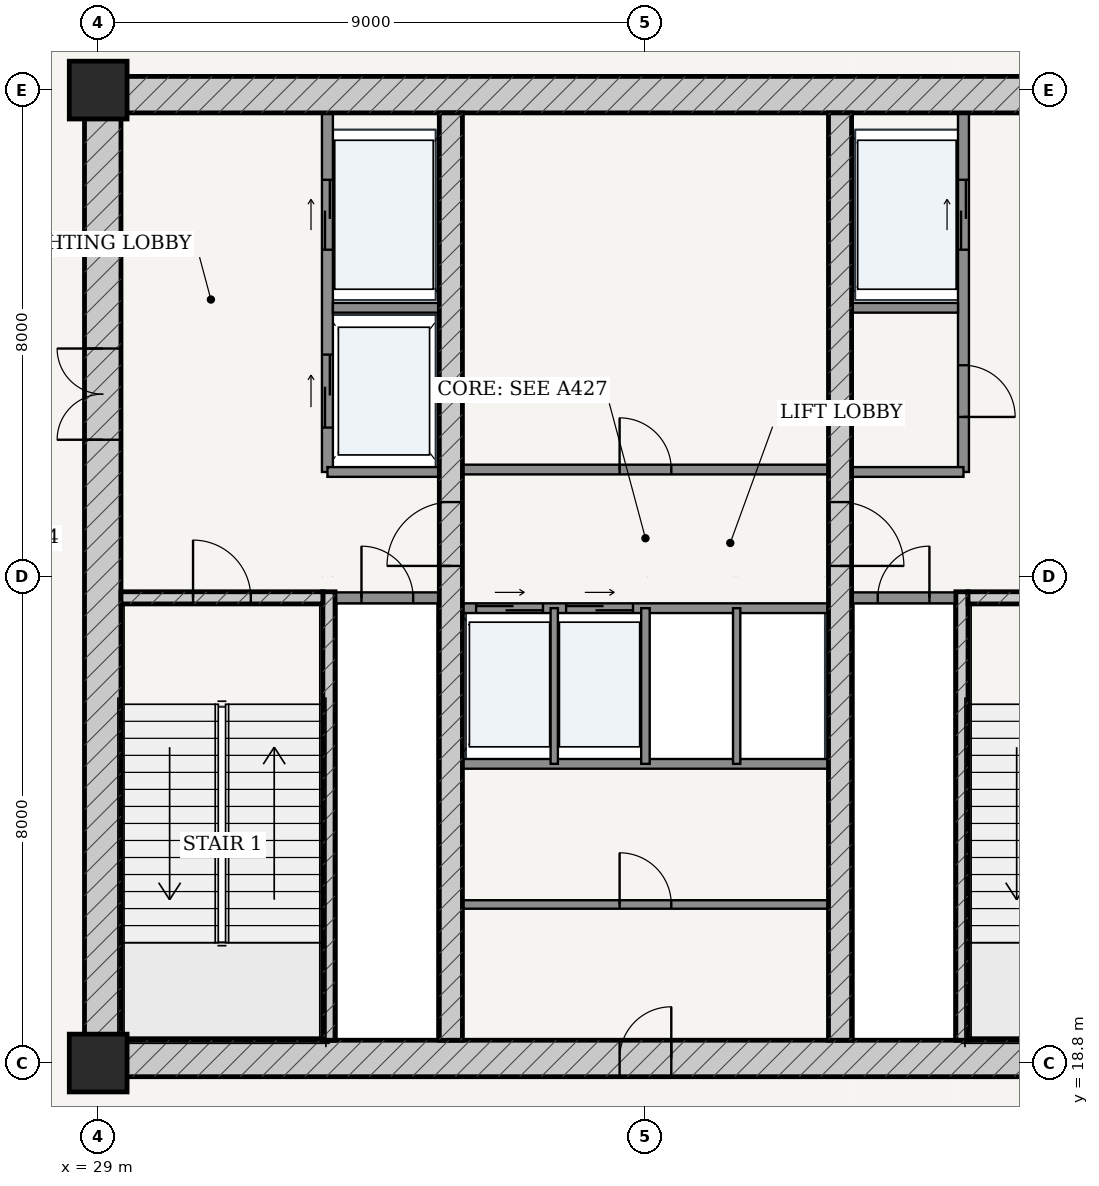
"""IFC4 building model, lengths in metres.
Left out: names, types, materials, properties, quantities, classifications, styles, units other than length and angle.
Written with IfcOpenShell. Run it as: python <this file> out.ifc"""

import sys

from ifc_helpers import new_model, si_unit, direction, frame, frame_2d, origin, origin_2d, place, context, subcontext, project, spatial, rectangle, extrude, source, transform, mapped, element, fill, save


model = new_model("IFC4")
c1 = context("Model", 3, precision=1e-05, world=origin(), true_north=direction((-0.2419218956, 0.970295726276)))
c2 = subcontext(c1, "Body", "Model", "MODEL_VIEW")
j1 = project(units=[si_unit("LENGTHUNIT", "METRE"), si_unit("PLANEANGLEUNIT", "RADIAN")], contexts=[c1])
p1 = place(None, origin())
s1 = spatial("IfcSite", under=j1, at=p1, CompositionType="ELEMENT")
p2 = place(p1, origin())
s2 = spatial("IfcBuilding", under=s1, at=p2, CompositionType="ELEMENT")
p3 = place(p2, frame((0.0, 0.0, 185.8)))
s3 = spatial("IfcBuildingStorey", under=s2, at=p3, CompositionType="ELEMENT", Elevation=185.8)
for number, where, z_axis, x_axis in (
    (1, (29.0, 18.8, 0.0), (0.0, 0.0, 1.0), (1.0, 0.0, 0.0)),
    (2, (29.0, 34.8, 0.0), (0.0, 0.0, 1.0), (1.0, 0.0, 0.0)),
):
    element("IfcColumn", number, at=place(p3, frame(where, z_axis=z_axis, x_axis=x_axis)), inside=s3, PredefinedType="COLUMN", context=c2, shape_type="SweptSolid", body=[
        extrude(rectangle(XDim=0.95, YDim=0.95, at=origin_2d()), origin(), (0.0, 0.0, 1.0), 5.4),
    ])
p4 = place(p3, frame((28.775, 18.875, 0.0), z_axis=(0.0, 0.0, 1.0), x_axis=(1.0, 0.0, 0.0)))
e3 = element("IfcWall", 3, at=p4, inside=s3, PredefinedType="SHEAR", context=c2, shape_type="SweptSolid", body=[
    extrude(rectangle(XDim=18.45, YDim=0.6, at=frame_2d((9.225, 0.0))), origin(), (0.0, 0.0, 1.0), 5.135),
])
p5 = place(p4, frame((8.8, 0.0, 0.0)))
e4 = element("IfcOpeningElement", 4, at=p5, cuts=e3, PredefinedType="OPENING", context=c2, shape_type="SweptSolid", body=[
    extrude(rectangle(XDim=0.85, YDim=2.1, at=frame_2d((0.425, 1.05))), frame((0.0, 0.31, 0.0), z_axis=(0.0, -1.0, 0.0), x_axis=(1.0, 0.0, 0.0)), (0.0, 0.0, 1.0), 0.62),
])
p6 = place(p3, frame((28.775, 34.725, 0.0), z_axis=(0.0, 0.0, 1.0), x_axis=(1.0, 0.0, 0.0)))
e5 = element("IfcWall", 5, at=p6, inside=s3, PredefinedType="SHEAR", context=c2, shape_type="SweptSolid", body=[
    extrude(rectangle(XDim=18.45, YDim=0.6, at=frame_2d((9.225, 0.0))), origin(), (0.0, 0.0, 1.0), 5.135),
])
p7 = place(p3, frame((29.075, 19.175, 0.0), z_axis=(0.0, 0.0, 1.0), x_axis=(0.0, 1.0, 0.0)))
e6 = element("IfcWall", 6, at=p7, inside=s3, PredefinedType="SHEAR", context=c2, shape_type="SweptSolid", body=[
    extrude(rectangle(XDim=15.25, YDim=0.6, at=frame_2d((7.625, 0.0))), origin(), (0.0, 0.0, 1.0), 5.135),
])
p8 = place(p7, frame((9.875, 0.0, 0.0)))
e7 = element("IfcOpeningElement", 7, at=p8, cuts=e6, PredefinedType="OPENING", context=c2, shape_type="SweptSolid", body=[
    extrude(rectangle(XDim=1.5, YDim=2.2, at=frame_2d((0.75, 1.1))), frame((0.0, 0.31, 0.0), z_axis=(0.0, -1.0, 0.0), x_axis=(1.0, 0.0, 0.0)), (0.0, 0.0, 1.0), 0.62),
])
p9 = place(p3, frame((32.795, 19.175, 0.0), z_axis=(0.0, 0.0, 1.0), x_axis=(0.0, 1.0, 0.0)))
e8 = element("IfcWall", 8, at=p9, inside=s3, PredefinedType="SOLIDWALL", context=c2, shape_type="SweptSolid", body=[
    extrude(rectangle(XDim=7.375, YDim=0.2, at=frame_2d((3.688, 0.0))), origin(), (0.0, 0.0, 1.0), 5.135),
])
p10 = place(p3, frame((29.375, 26.45, 0.0), z_axis=(0.0, 0.0, 1.0), x_axis=(1.0, 0.0, 0.0)))
e9 = element("IfcWall", 9, at=p10, inside=s3, PredefinedType="SOLIDWALL", context=c2, shape_type="SweptSolid", body=[
    extrude(rectangle(XDim=3.32, YDim=0.2, at=frame_2d((1.66, 0.0))), origin(), (0.0, 0.0, 1.0), 5.135),
])
p11 = place(p10, frame((1.185, 0.0, 0.0)))
e10 = element("IfcOpeningElement", 10, at=p11, cuts=e9, PredefinedType="OPENING", context=c2, shape_type="SweptSolid", body=[
    extrude(rectangle(XDim=0.95, YDim=2.15, at=frame_2d((0.475, 1.075))), frame((0.0, 0.11, 0.0), z_axis=(0.0, -1.0, 0.0), x_axis=(1.0, 0.0, 0.0)), (0.0, 0.0, 1.0), 0.22),
])
p12 = place(p3, frame((43.205, 19.175, 0.0), z_axis=(0.0, 0.0, 1.0), x_axis=(0.0, 1.0, 0.0)))
e11 = element("IfcWall", 11, at=p12, inside=s3, PredefinedType="SOLIDWALL", context=c2, shape_type="SweptSolid", body=[
    extrude(rectangle(XDim=7.375, YDim=0.2, at=frame_2d((3.688, 0.0))), origin(), (0.0, 0.0, 1.0), 5.135),
])
p13 = place(p3, frame((43.305, 26.45, 0.0), z_axis=(0.0, 0.0, 1.0), x_axis=(1.0, 0.0, 0.0)))
e12 = element("IfcWall", 12, at=p13, inside=s3, PredefinedType="SOLIDWALL", context=c2, shape_type="SweptSolid", body=[
    extrude(rectangle(XDim=3.32, YDim=0.2, at=frame_2d((1.66, 0.0))), origin(), (0.0, 0.0, 1.0), 5.135),
])
p14 = place(p13, frame((1.185, 0.0, 0.0)))
e13 = element("IfcOpeningElement", 13, at=p14, cuts=e12, PredefinedType="OPENING", context=c2, shape_type="SweptSolid", body=[
    extrude(rectangle(XDim=0.95, YDim=2.15, at=frame_2d((0.475, 1.075))), frame((0.0, 0.11, 0.0), z_axis=(0.0, -1.0, 0.0), x_axis=(1.0, 0.0, 0.0)), (0.0, 0.0, 1.0), 0.22),
])
p15 = place(p3, frame((34.8, 19.175, 0.0), z_axis=(0.0, 0.0, 1.0), x_axis=(0.0, 1.0, 0.0)))
e14 = element("IfcWall", 14, at=p15, inside=s3, PredefinedType="SHEAR", context=c2, shape_type="SweptSolid", body=[
    extrude(rectangle(XDim=15.25, YDim=0.38, at=frame_2d((7.625, 0.0))), origin(), (0.0, 0.0, 1.0), 5.135),
])
p16 = place(p15, frame((7.8, 0.0, 0.0)))
e15 = element("IfcOpeningElement", 15, at=p16, cuts=e14, PredefinedType="OPENING", context=c2, shape_type="SweptSolid", body=[
    extrude(rectangle(XDim=1.05, YDim=2.15, at=frame_2d((0.525, 1.075))), frame((0.0, 0.2, 0.0), z_axis=(0.0, -1.0, 0.0), x_axis=(1.0, 0.0, 0.0)), (0.0, 0.0, 1.0), 0.4),
])
p17 = place(p3, frame((41.2, 19.175, 0.0), z_axis=(0.0, 0.0, 1.0), x_axis=(0.0, 1.0, 0.0)))
e16 = element("IfcWall", 16, at=p17, inside=s3, PredefinedType="SHEAR", context=c2, shape_type="SweptSolid", body=[
    extrude(rectangle(XDim=15.25, YDim=0.38, at=frame_2d((7.625, 0.0))), origin(), (0.0, 0.0, 1.0), 5.135),
])
p18 = place(p17, frame((7.8, 0.0, 0.0)))
e17 = element("IfcOpeningElement", 17, at=p18, cuts=e16, PredefinedType="OPENING", context=c2, shape_type="SweptSolid", body=[
    extrude(rectangle(XDim=1.05, YDim=2.15, at=frame_2d((0.525, 1.075))), frame((0.0, 0.2, 0.0), z_axis=(0.0, -1.0, 0.0), x_axis=(1.0, 0.0, 0.0)), (0.0, 0.0, 1.0), 0.4),
])
p19 = place(p3, frame((32.9, 26.45, 0.0), z_axis=(0.0, 0.0, 1.0), x_axis=(1.0, 0.0, 0.0)))
e18 = element("IfcWall", 18, at=p19, inside=s3, PredefinedType="PARTITIONING", context=c2, shape_type="SweptSolid", body=[
    extrude(rectangle(XDim=1.71, YDim=0.18, at=frame_2d((0.855, 0.0))), origin(), (0.0, 0.0, 1.0), 5.135),
])
p20 = place(p19, frame((0.43, 0.0, 0.0)))
e19 = element("IfcOpeningElement", 19, at=p20, cuts=e18, PredefinedType="OPENING", context=c2, shape_type="SweptSolid", body=[
    extrude(rectangle(XDim=0.85, YDim=2.1, at=frame_2d((0.425, 1.05))), frame((0.0, 0.1, 0.0), z_axis=(0.0, -1.0, 0.0), x_axis=(1.0, 0.0, 0.0)), (0.0, 0.0, 1.0), 0.2),
])
p21 = place(p3, frame((41.39, 26.45, 0.0), z_axis=(0.0, 0.0, 1.0), x_axis=(1.0, 0.0, 0.0)))
e20 = element("IfcWall", 20, at=p21, inside=s3, PredefinedType="PARTITIONING", context=c2, shape_type="SweptSolid", body=[
    extrude(rectangle(XDim=1.71, YDim=0.18, at=frame_2d((0.855, 0.0))), origin(), (0.0, 0.0, 1.0), 5.135),
])
p22 = place(p21, frame((0.43, 0.0, 0.0)))
e21 = element("IfcOpeningElement", 21, at=p22, cuts=e20, PredefinedType="OPENING", context=c2, shape_type="SweptSolid", body=[
    extrude(rectangle(XDim=0.85, YDim=2.1, at=frame_2d((0.425, 1.05))), frame((0.0, 0.1, 0.0), z_axis=(0.0, -1.0, 0.0), x_axis=(1.0, 0.0, 0.0)), (0.0, 0.0, 1.0), 0.2),
])
p23 = place(p3, frame((32.77, 28.52, 0.0), z_axis=(0.0, 0.0, 1.0), x_axis=(0.0, 1.0, 0.0)))
e22 = element("IfcWall", 22, at=p23, inside=s3, PredefinedType="PARTITIONING", context=c2, shape_type="SweptSolid", body=[
    extrude(rectangle(XDim=5.905, YDim=0.18, at=frame_2d((2.953, 0.0))), origin(), (0.0, 0.0, 1.0), 5.135),
])
p24 = place(p23, frame((3.655, 0.0, 0.0)))
e23 = element("IfcOpeningElement", 23, at=p24, cuts=e22, PredefinedType="OPENING", context=c2, shape_type="SweptSolid", body=[
    extrude(rectangle(XDim=1.15, YDim=2.2, at=frame_2d((0.575, 1.1))), frame((0.0, 0.1, 0.0), z_axis=(0.0, -1.0, 0.0), x_axis=(1.0, 0.0, 0.0)), (0.0, 0.0, 1.0), 0.2),
])
p25 = place(p23, frame((0.73, 0.0, 0.0)))
e24 = element("IfcOpeningElement", 24, at=p25, cuts=e22, PredefinedType="OPENING", context=c2, shape_type="SweptSolid", body=[
    extrude(rectangle(XDim=1.2, YDim=2.25, at=frame_2d((0.6, 1.125))), frame((0.0, 0.1, 0.0), z_axis=(0.0, -1.0, 0.0), x_axis=(1.0, 0.0, 0.0)), (0.0, 0.0, 1.0), 0.2),
])
p26 = place(p3, frame((32.86, 31.22, 0.0), z_axis=(0.0, 0.0, 1.0), x_axis=(1.0, 0.0, 0.0)))
e25 = element("IfcWall", 25, at=p26, inside=s3, PredefinedType="PARTITIONING", context=c2, shape_type="SweptSolid", body=[
    extrude(rectangle(XDim=1.75, YDim=0.16, at=frame_2d((0.875, 0.0))), origin(), (0.0, 0.0, 1.0), 5.135),
])
p27 = place(p3, frame((32.77, 28.52, 0.0), z_axis=(0.0, 0.0, 1.0), x_axis=(1.0, 0.0, 0.0)))
e26 = element("IfcWall", 26, at=p27, inside=s3, PredefinedType="PARTITIONING", context=c2, shape_type="SweptSolid", body=[
    extrude(rectangle(XDim=1.84, YDim=0.16, at=frame_2d((0.92, 0.0))), origin(), (0.0, 0.0, 1.0), 5.135),
])
p28 = place(p3, frame((43.23, 28.52, 0.0), z_axis=(0.0, 0.0, 1.0), x_axis=(0.0, 1.0, 0.0)))
e27 = element("IfcWall", 27, at=p28, inside=s3, PredefinedType="PARTITIONING", context=c2, shape_type="SweptSolid", body=[
    extrude(rectangle(XDim=5.905, YDim=0.18, at=frame_2d((2.953, 0.0))), origin(), (0.0, 0.0, 1.0), 5.135),
])
p29 = place(p28, frame((0.905, 0.0, 0.0)))
e28 = element("IfcOpeningElement", 28, at=p29, cuts=e27, PredefinedType="OPENING", context=c2, shape_type="SweptSolid", body=[
    extrude(rectangle(XDim=0.85, YDim=2.1, at=frame_2d((0.425, 1.05))), frame((0.0, 0.1, 0.0), z_axis=(0.0, -1.0, 0.0), x_axis=(1.0, 0.0, 0.0)), (0.0, 0.0, 1.0), 0.2),
])
p30 = place(p28, frame((3.655, 0.0, 0.0)))
e29 = element("IfcOpeningElement", 29, at=p30, cuts=e27, PredefinedType="OPENING", context=c2, shape_type="SweptSolid", body=[
    extrude(rectangle(XDim=1.15, YDim=2.2, at=frame_2d((0.575, 1.1))), frame((0.0, 0.1, 0.0), z_axis=(0.0, -1.0, 0.0), x_axis=(1.0, 0.0, 0.0)), (0.0, 0.0, 1.0), 0.2),
])
p31 = place(p3, frame((41.39, 31.22, 0.0), z_axis=(0.0, 0.0, 1.0), x_axis=(1.0, 0.0, 0.0)))
e30 = element("IfcWall", 30, at=p31, inside=s3, PredefinedType="PARTITIONING", context=c2, shape_type="SweptSolid", body=[
    extrude(rectangle(XDim=1.75, YDim=0.16, at=frame_2d((0.875, 0.0))), origin(), (0.0, 0.0, 1.0), 5.135),
])
p32 = place(p3, frame((41.39, 28.52, 0.0), z_axis=(0.0, 0.0, 1.0), x_axis=(1.0, 0.0, 0.0)))
e31 = element("IfcWall", 31, at=p32, inside=s3, PredefinedType="PARTITIONING", context=c2, shape_type="SweptSolid", body=[
    extrude(rectangle(XDim=1.84, YDim=0.16, at=frame_2d((0.92, 0.0))), origin(), (0.0, 0.0, 1.0), 5.135),
])
p33 = place(p3, frame((34.99, 28.56, 0.0), z_axis=(0.0, 0.0, 1.0), x_axis=(1.0, 0.0, 0.0)))
e32 = element("IfcWall", 32, at=p33, inside=s3, PredefinedType="PARTITIONING", context=c2, shape_type="SweptSolid", body=[
    extrude(rectangle(XDim=6.02, YDim=0.16, at=frame_2d((3.01, 0.0))), origin(), (0.0, 0.0, 1.0), 5.135),
])
p34 = place(p33, frame((2.585, 0.0, 0.0)))
e33 = element("IfcOpeningElement", 33, at=p34, cuts=e32, PredefinedType="OPENING", context=c2, shape_type="SweptSolid", body=[
    extrude(rectangle(XDim=0.85, YDim=2.1, at=frame_2d((0.425, 1.05))), frame((0.0, 0.09, 0.0), z_axis=(0.0, -1.0, 0.0), x_axis=(1.0, 0.0, 0.0)), (0.0, 0.0, 1.0), 0.18),
])
p35 = place(p3, frame((34.99, 26.28, 0.0), z_axis=(0.0, 0.0, 1.0), x_axis=(1.0, 0.0, 0.0)))
e34 = element("IfcWall", 34, at=p35, inside=s3, PredefinedType="PARTITIONING", context=c2, shape_type="SweptSolid", body=[
    extrude(rectangle(XDim=6.02, YDim=0.16, at=frame_2d((3.01, 0.0))), origin(), (0.0, 0.0, 1.0), 5.135),
])
p36 = place(p35, frame((0.225, 0.0, 0.0)))
e35 = element("IfcOpeningElement", 35, at=p36, cuts=e34, PredefinedType="OPENING", context=c2, shape_type="SweptSolid", body=[
    extrude(rectangle(XDim=1.1, YDim=2.2, at=frame_2d((0.55, 1.1))), frame((0.0, 0.09, 0.0), z_axis=(0.0, -1.0, 0.0), x_axis=(1.0, 0.0, 0.0)), (0.0, 0.0, 1.0), 0.18),
])
p37 = place(p35, frame((1.705, 0.0, 0.0)))
e36 = element("IfcOpeningElement", 36, at=p37, cuts=e34, PredefinedType="OPENING", context=c2, shape_type="SweptSolid", body=[
    extrude(rectangle(XDim=1.1, YDim=2.2, at=frame_2d((0.55, 1.1))), frame((0.0, 0.09, 0.0), z_axis=(0.0, -1.0, 0.0), x_axis=(1.0, 0.0, 0.0)), (0.0, 0.0, 1.0), 0.18),
])
p38 = place(p3, frame((34.99, 23.72, 0.0), z_axis=(0.0, 0.0, 1.0), x_axis=(1.0, 0.0, 0.0)))
e37 = element("IfcWall", 37, at=p38, inside=s3, PredefinedType="PARTITIONING", context=c2, shape_type="SweptSolid", body=[
    extrude(rectangle(XDim=6.02, YDim=0.16, at=frame_2d((3.01, 0.0))), origin(), (0.0, 0.0, 1.0), 5.135),
])
p39 = place(p3, frame((36.5, 23.72, 0.0), z_axis=(0.0, 0.0, 1.0), x_axis=(0.0, 1.0, 0.0)))
e38 = element("IfcWall", 38, at=p39, inside=s3, PredefinedType="PARTITIONING", context=c2, shape_type="SweptSolid", body=[
    extrude(rectangle(XDim=2.56, YDim=0.12, at=frame_2d((1.28, 0.0))), origin(), (0.0, 0.0, 1.0), 5.135),
])
p40 = place(p3, frame((38.0, 23.72, 0.0), z_axis=(0.0, 0.0, 1.0), x_axis=(0.0, 1.0, 0.0)))
e39 = element("IfcWall", 39, at=p40, inside=s3, PredefinedType="PARTITIONING", context=c2, shape_type="SweptSolid", body=[
    extrude(rectangle(XDim=2.56, YDim=0.14, at=frame_2d((1.28, 0.0))), origin(), (0.0, 0.0, 1.0), 5.135),
])
p41 = place(p3, frame((39.5, 23.72, 0.0), z_axis=(0.0, 0.0, 1.0), x_axis=(0.0, 1.0, 0.0)))
e40 = element("IfcWall", 40, at=p41, inside=s3, PredefinedType="PARTITIONING", context=c2, shape_type="SweptSolid", body=[
    extrude(rectangle(XDim=2.56, YDim=0.12, at=frame_2d((1.28, 0.0))), origin(), (0.0, 0.0, 1.0), 5.135),
])
p42 = place(p3, frame((34.99, 21.407, 0.0), z_axis=(0.0, 0.0, 1.0), x_axis=(1.0, 0.0, 0.0)))
e41 = element("IfcWall", 41, at=p42, inside=s3, PredefinedType="PARTITIONING", context=c2, shape_type="SweptSolid", body=[
    extrude(rectangle(XDim=6.02, YDim=0.14, at=frame_2d((3.01, 0.0))), origin(), (0.0, 0.0, 1.0), 5.135),
])
p43 = place(p42, frame((2.585, 0.0, 0.0)))
e42 = element("IfcOpeningElement", 42, at=p43, cuts=e41, PredefinedType="OPENING", context=c2, shape_type="SweptSolid", body=[
    extrude(rectangle(XDim=0.85, YDim=2.1, at=frame_2d((0.425, 1.05))), frame((0.0, 0.08, 0.0), z_axis=(0.0, -1.0, 0.0), x_axis=(1.0, 0.0, 0.0)), (0.0, 0.0, 1.0), 0.16),
])
m1 = source(origin(), c2, "Body", "SweptSolid", [
    extrude(rectangle(XDim=1.5, YDim=2.2, at=frame_2d((0.75, 1.1))), frame((0.0, 0.025, 0.0), z_axis=(0.0, -1.0, 0.0), x_axis=(1.0, 0.0, 0.0)), (0.0, 0.0, 1.0), 0.05),
])
p44 = place(p8, origin())
e43 = element("IfcDoor", 43, at=p44, inside=s3, OperationType="DOUBLE_DOOR_SINGLE_SWING", PredefinedType="DOOR", context=c2, shape_type="MappedRepresentation", body=[
    mapped(m1, transform((0.0, 0.0, 0.0), scale=1.0)),
])
fill(e7, e43)
m2 = source(origin(), c2, "Body", "SweptSolid", [
    extrude(rectangle(XDim=1.05, YDim=2.15, at=frame_2d((0.525, 1.075))), frame((0.0, 0.025, 0.0), z_axis=(0.0, -1.0, 0.0), x_axis=(1.0, 0.0, 0.0)), (0.0, 0.0, 1.0), 0.05),
])
p45 = place(p16, origin())
e44 = element("IfcDoor", 44, at=p45, inside=s3, OperationType="SINGLE_SWING_LEFT", PredefinedType="DOOR", context=c2, shape_type="MappedRepresentation", body=[
    mapped(m2, transform((0.0, 0.0, 0.0), scale=1.0)),
])
fill(e15, e44)
p46 = place(p18, frame((1.05, 0.0, 0.0), z_axis=(0.0, 0.0, 1.0), x_axis=(-1.0, 0.0, 0.0)))
e45 = element("IfcDoor", 45, at=p46, inside=s3, OperationType="SINGLE_SWING_RIGHT", PredefinedType="DOOR", context=c2, shape_type="MappedRepresentation", body=[
    mapped(m2, transform((0.0, 0.0, 0.0), scale=1.0)),
])
fill(e17, e45)
m3 = source(origin(), c2, "Body", "SweptSolid", [
    extrude(rectangle(XDim=0.95, YDim=2.15, at=frame_2d((0.475, 1.075))), frame((0.0, 0.025, 0.0), z_axis=(0.0, -1.0, 0.0), x_axis=(1.0, 0.0, 0.0)), (0.0, 0.0, 1.0), 0.05),
])
p47 = place(p11, origin())
e46 = element("IfcDoor", 46, at=p47, inside=s3, OperationType="SINGLE_SWING_LEFT", PredefinedType="DOOR", context=c2, shape_type="MappedRepresentation", body=[
    mapped(m3, transform((0.0, 0.0, 0.0), scale=1.0)),
])
fill(e10, e46)
m4 = source(origin(), c2, "Body", "SweptSolid", [
    extrude(rectangle(XDim=0.85, YDim=2.1, at=frame_2d((0.425, 1.05))), frame((0.0, 0.025, 0.0), z_axis=(0.0, -1.0, 0.0), x_axis=(1.0, 0.0, 0.0)), (0.0, 0.0, 1.0), 0.05),
])
p48 = place(p20, origin())
e47 = element("IfcDoor", 47, at=p48, inside=s3, OperationType="SINGLE_SWING_LEFT", PredefinedType="DOOR", context=c2, shape_type="MappedRepresentation", body=[
    mapped(m4, transform((0.0, 0.0, 0.0), scale=1.0)),
])
fill(e19, e47)
p49 = place(p22, origin())
e48 = element("IfcDoor", 48, at=p49, inside=s3, OperationType="SINGLE_SWING_RIGHT", PredefinedType="DOOR", context=c2, shape_type="MappedRepresentation", body=[
    mapped(m4, transform((0.0, 0.0, 0.0), scale=1.0)),
])
fill(e21, e48)
p50 = place(p29, frame((0.85, 0.0, 0.0), z_axis=(0.0, 0.0, 1.0), x_axis=(-1.0, 0.0, 0.0)))
e49 = element("IfcDoor", 49, at=p50, inside=s3, OperationType="SINGLE_SWING_RIGHT", PredefinedType="DOOR", context=c2, shape_type="MappedRepresentation", body=[
    mapped(m4, transform((0.0, 0.0, 0.0), scale=1.0)),
])
fill(e28, e49)
p51 = place(p34, origin())
e50 = element("IfcDoor", 50, at=p51, inside=s3, OperationType="SINGLE_SWING_LEFT", PredefinedType="DOOR", context=c2, shape_type="MappedRepresentation", body=[
    mapped(m4, transform((0.0, 0.0, 0.0), scale=1.0)),
])
fill(e33, e50)
p52 = place(p5, origin())
e51 = element("IfcDoor", 51, at=p52, inside=s3, OperationType="SINGLE_SWING_RIGHT", PredefinedType="DOOR", context=c2, shape_type="MappedRepresentation", body=[
    mapped(m4, transform((0.0, 0.0, 0.0), scale=1.0)),
])
fill(e4, e51)
p53 = place(p43, origin())
e52 = element("IfcDoor", 52, at=p53, inside=s3, OperationType="SINGLE_SWING_LEFT", PredefinedType="DOOR", context=c2, shape_type="MappedRepresentation", body=[
    mapped(m4, transform((0.0, 0.0, 0.0), scale=1.0)),
])
fill(e42, e52)
m5 = source(origin(), c2, "Body", "SweptSolid", [
    extrude(rectangle(XDim=1.15, YDim=2.2, at=frame_2d((0.575, 1.1))), frame((0.0, 0.025, 0.0), z_axis=(0.0, -1.0, 0.0), x_axis=(1.0, 0.0, 0.0)), (0.0, 0.0, 1.0), 0.05),
])
p54 = place(p24, origin())
e53 = element("IfcDoor", 53, at=p54, inside=s3, OperationType="DOUBLE_DOOR_SLIDING", PredefinedType="DOOR", context=c2, shape_type="MappedRepresentation", body=[
    mapped(m5, transform((0.0, 0.0, 0.0), scale=1.0)),
])
fill(e23, e53)
p55 = place(p30, origin())
e54 = element("IfcDoor", 54, at=p55, inside=s3, OperationType="DOUBLE_DOOR_SLIDING", PredefinedType="DOOR", context=c2, shape_type="MappedRepresentation", body=[
    mapped(m5, transform((0.0, 0.0, 0.0), scale=1.0)),
])
fill(e29, e54)
m6 = source(origin(), c2, "Body", "SweptSolid", [
    extrude(rectangle(XDim=1.2, YDim=2.25, at=frame_2d((0.6, 1.125))), frame((0.0, 0.025, 0.0), z_axis=(0.0, -1.0, 0.0), x_axis=(1.0, 0.0, 0.0)), (0.0, 0.0, 1.0), 0.05),
])
p56 = place(p25, origin())
e55 = element("IfcDoor", 55, at=p56, inside=s3, OperationType="DOUBLE_DOOR_SLIDING", PredefinedType="DOOR", context=c2, shape_type="MappedRepresentation", body=[
    mapped(m6, transform((0.0, 0.0, 0.0), scale=1.0)),
])
fill(e24, e55)
m7 = source(origin(), c2, "Body", "SweptSolid", [
    extrude(rectangle(XDim=1.1, YDim=2.2, at=frame_2d((0.55, 1.1))), frame((0.0, 0.025, 0.0), z_axis=(0.0, -1.0, 0.0), x_axis=(1.0, 0.0, 0.0)), (0.0, 0.0, 1.0), 0.05),
])
p57 = place(p36, origin())
e56 = element("IfcDoor", 56, at=p57, inside=s3, OperationType="DOUBLE_DOOR_SLIDING", PredefinedType="DOOR", context=c2, shape_type="MappedRepresentation", body=[
    mapped(m7, transform((0.0, 0.0, 0.0), scale=1.0)),
])
fill(e35, e56)
p58 = place(p37, origin())
e57 = element("IfcDoor", 57, at=p58, inside=s3, OperationType="DOUBLE_DOOR_SLIDING", PredefinedType="DOOR", context=c2, shape_type="MappedRepresentation", body=[
    mapped(m7, transform((0.0, 0.0, 0.0), scale=1.0)),
])
fill(e36, e57)
save(model, sys.argv[1])
